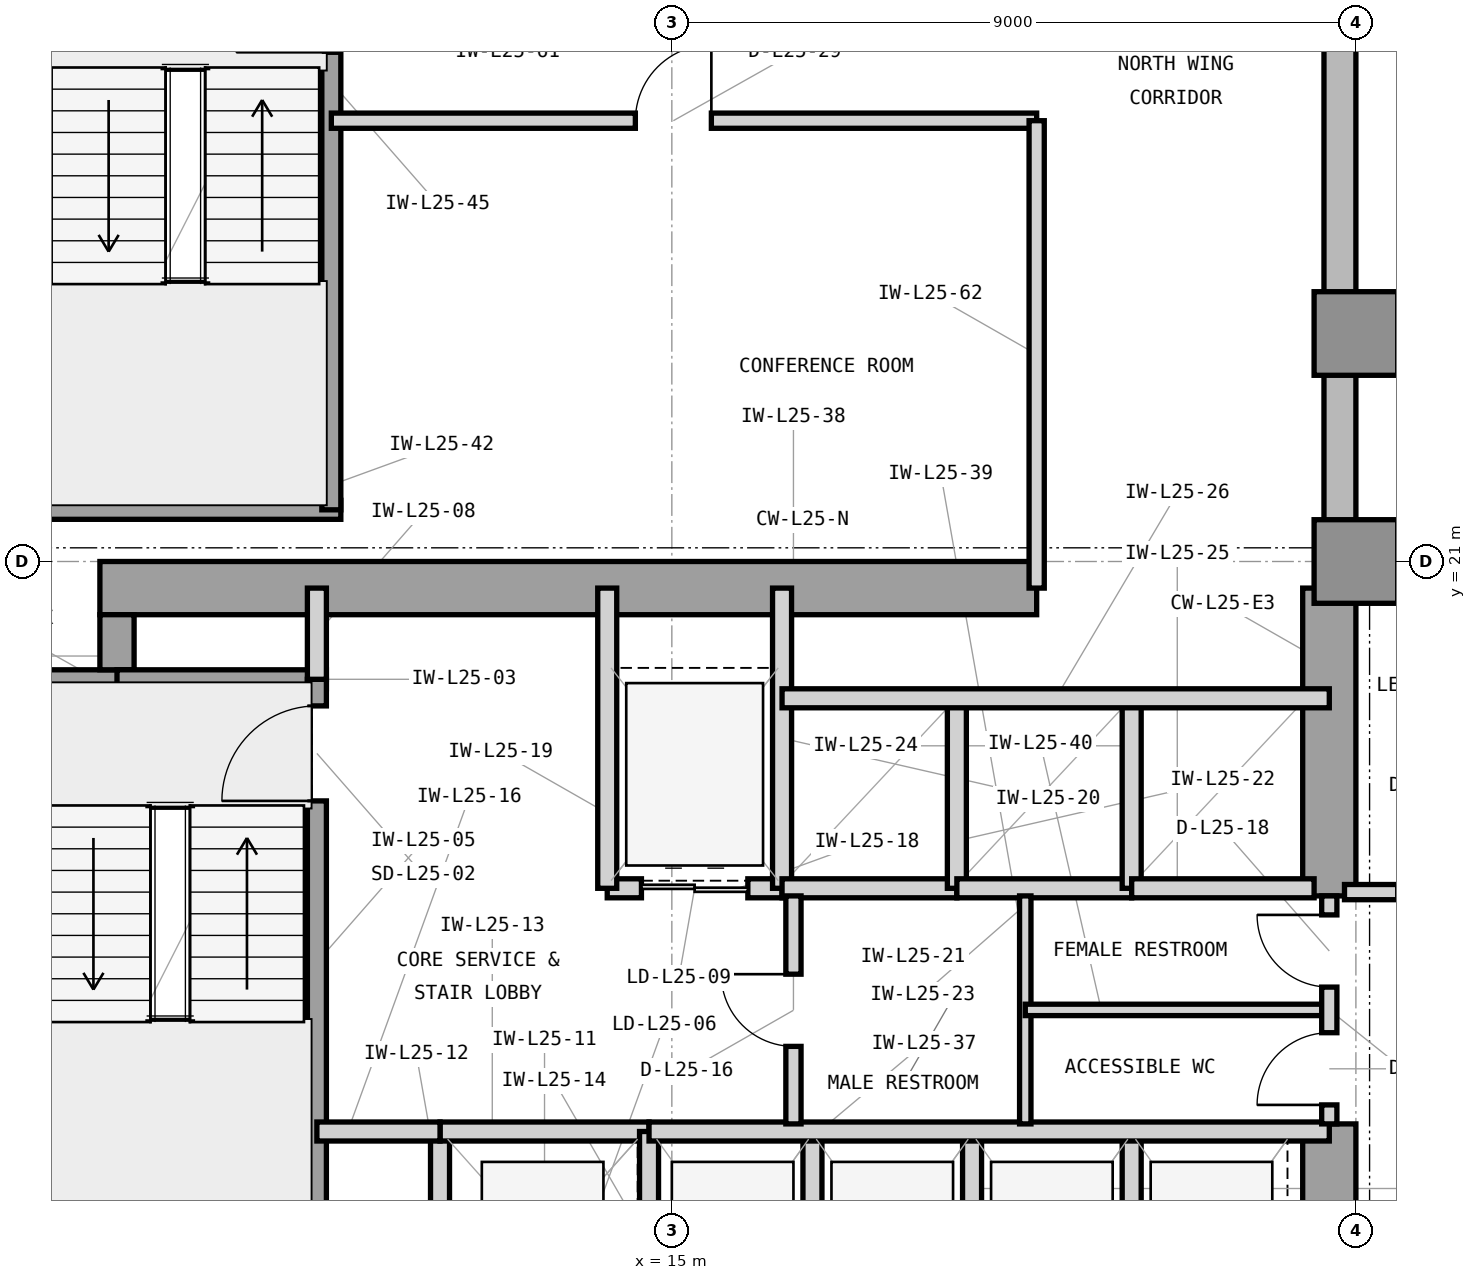
"""IFC4 building model, lengths in metres.
Left out: names, types, materials, properties, quantities, classifications, styles, units other than length and angle.
Written with IfcOpenShell. Run it as: python <this file> out.ifc"""

import sys

from ifc_helpers import new_model, si_unit, direction, frame, frame_2d, origin, origin_2d, place, context, subcontext, project, spatial, rectangle, extrude, element, fill, save


model = new_model("IFC4")
c1 = context("Model", 3, precision=1e-05, world=origin(), true_north=direction((0.0, 1.0)))
c2 = subcontext(c1, "Body", "Model", "MODEL_VIEW")
j1 = project(units=[si_unit("LENGTHUNIT", "METRE"), si_unit("PLANEANGLEUNIT", "RADIAN")], contexts=[c1])
p1 = place(None, origin())
s1 = spatial("IfcSite", under=j1, at=p1, CompositionType="ELEMENT")
p2 = place(p1, origin())
s2 = spatial("IfcBuilding", under=s1, at=p2, CompositionType="ELEMENT")
p3 = place(p2, frame((0.0, 0.0, 108.9)))
s3 = spatial("IfcBuildingStorey", under=s2, at=p3, CompositionType="ELEMENT", Elevation=108.9)
p4 = place(p3, frame((7.475, 20.65, 0.0), z_axis=(0.0, 0.0, 1.0), x_axis=(1.0, 0.0, 0.0)))
e1 = element("IfcWall", 1, at=p4, inside=s3, PredefinedType="SHEAR", context=c2, shape_type="SweptSolid", body=[
    extrude(rectangle(XDim=12.325, YDim=0.7, at=frame_2d((6.163, 0.0))), origin(), (0.0, 0.0, 1.0), 3.9),
])
p5 = place(p3, frame((23.65, 10.4, 0.0), z_axis=(0.0, 0.0, 1.0), x_axis=(0.0, 1.0, 0.0)))
e2 = element("IfcWall", 2, at=p5, inside=s3, PredefinedType="SHEAR", context=c2, shape_type="SweptSolid", body=[
    extrude(rectangle(XDim=3.2, YDim=0.7, at=frame_2d((1.6, 0.0))), origin(), (0.0, 0.0, 1.0), 3.9),
])
p6 = place(p3, frame((23.65, 16.6, 0.0), z_axis=(0.0, 0.0, 1.0), x_axis=(0.0, 1.0, 0.0)))
e3 = element("IfcWall", 3, at=p6, inside=s3, PredefinedType="SHEAR", context=c2, shape_type="SweptSolid", body=[
    extrude(rectangle(XDim=4.05, YDim=0.7, at=frame_2d((2.025, 0.0))), origin(), (0.0, 0.0, 1.0), 3.9),
])
p7 = place(p3, frame((6.7, 19.35, 0.0), z_axis=(0.0, 0.0, 1.0), x_axis=(1.0, 0.0, 0.0)))
e4 = element("IfcWall", 4, at=p7, inside=s3, PredefinedType="SHEAR", context=c2, shape_type="SweptSolid", body=[
    extrude(rectangle(XDim=1.225, YDim=0.45, at=frame_2d((0.613, 0.0))), origin(), (0.0, 0.0, 1.0), 3.9),
])
p8 = place(p3, frame((7.7, 19.575, 0.0), z_axis=(0.0, 0.0, 1.0), x_axis=(0.0, 1.0, 0.0)))
e5 = element("IfcWall", 5, at=p8, inside=s3, PredefinedType="SHEAR", context=c2, shape_type="SweptSolid", body=[
    extrude(rectangle(XDim=0.725, YDim=0.45, at=frame_2d((0.363, 0.0))), origin(), (0.0, 0.0, 1.0), 3.9),
])
for number, where, z_axis, x_axis in (
    (6, (24.0, 21.0, 0.0), (0.0, 0.0, 1.0), (1.0, 0.0, 0.0)),
    (7, (24.0, 24.0, 0.0), (0.0, 0.0, 1.0), (1.0, 0.0, 0.0)),
):
    element("IfcColumn", number, at=place(p3, frame(where, z_axis=z_axis, x_axis=x_axis)), inside=s3, PredefinedType="COLUMN", context=c2, shape_type="SweptSolid", body=[
        extrude(rectangle(XDim=1.1, YDim=1.1, at=origin_2d()), origin(), (0.0, 0.0, 1.0), 3.9),
    ])
p9 = place(p3, frame((61.4, 20.79, 0.0), z_axis=(0.0, 0.0, 1.0), x_axis=(-1.0, 0.0, 0.0)))
e8 = element("IfcWall", 8, at=p9, inside=s3, PredefinedType="STANDARD", context=c2, shape_type="SweptSolid", body=[
    extrude(rectangle(XDim=37.4, YDim=0.42, at=frame_2d((18.7, 0.0))), origin(), (0.0, 0.0, 1.0), 3.7),
])
p10 = place(p9, frame((35.222, 0.0, 0.85)))
e9 = element("IfcOpeningElement", 9, at=p10, cuts=e8, PredefinedType="OPENING", context=c2, shape_type="SweptSolid", body=[
    extrude(rectangle(XDim=1.2, YDim=2.25, at=frame_2d((0.6, 1.125))), frame((0.0, 0.22, 0.0), z_axis=(0.0, -1.0, 0.0), x_axis=(1.0, 0.0, 0.0)), (0.0, 0.0, 1.0), 0.44),
])
p11 = place(p9, frame((29.386, 0.0, 0.85)))
e10 = element("IfcOpeningElement", 10, at=p11, cuts=e8, PredefinedType="OPENING", context=c2, shape_type="SweptSolid", body=[
    extrude(rectangle(XDim=2.5, YDim=2.25, at=frame_2d((1.25, 1.125))), frame((0.0, 0.22, 0.0), z_axis=(0.0, -1.0, 0.0), x_axis=(1.0, 0.0, 0.0)), (0.0, 0.0, 1.0), 0.44),
])
p12 = place(p9, frame((20.386, 0.0, 0.85)))
e11 = element("IfcOpeningElement", 11, at=p12, cuts=e8, PredefinedType="OPENING", context=c2, shape_type="SweptSolid", body=[
    extrude(rectangle(XDim=2.5, YDim=2.25, at=frame_2d((1.25, 1.125))), frame((0.0, 0.22, 0.0), z_axis=(0.0, -1.0, 0.0), x_axis=(1.0, 0.0, 0.0)), (0.0, 0.0, 1.0), 0.44),
])
p13 = place(p9, frame((8.336, 0.0, 0.85)))
e12 = element("IfcOpeningElement", 12, at=p13, cuts=e8, PredefinedType="OPENING", context=c2, shape_type="SweptSolid", body=[
    extrude(rectangle(XDim=1.2, YDim=2.25, at=frame_2d((0.6, 1.125))), frame((0.0, 0.22, 0.0), z_axis=(0.0, -1.0, 0.0), x_axis=(1.0, 0.0, 0.0)), (0.0, 0.0, 1.0), 0.44),
])
p14 = place(p3, frame((23.79, 21.0, 0.0), z_axis=(0.0, 0.0, 1.0), x_axis=(0.0, 1.0, 0.0)))
e13 = element("IfcWall", 13, at=p14, inside=s3, PredefinedType="STANDARD", context=c2, shape_type="SweptSolid", body=[
    extrude(rectangle(XDim=25.4, YDim=0.42, at=frame_2d((12.7, 0.0))), origin(), (0.0, 0.0, 1.0), 3.7),
])
p15 = place(p14, frame((11.45, 0.0, 0.85)))
e14 = element("IfcOpeningElement", 14, at=p15, cuts=e13, PredefinedType="OPENING", context=c2, shape_type="SweptSolid", body=[
    extrude(rectangle(XDim=2.5, YDim=2.25, at=frame_2d((1.25, 1.125))), frame((0.0, 0.22, 0.0), z_axis=(0.0, -1.0, 0.0), x_axis=(1.0, 0.0, 0.0)), (0.0, 0.0, 1.0), 0.44),
])
p16 = place(p3, frame((7.7, 19.45, 0.0), z_axis=(0.0, 0.0, 1.0), x_axis=(1.0, 0.0, 0.0)))
e15 = element("IfcWall", 15, at=p16, inside=s3, PredefinedType="SHEAR", context=c2, shape_type="SweptSolid", body=[
    extrude(rectangle(XDim=2.755, YDim=0.25, at=frame_2d((1.377, 0.0))), origin(), (0.0, 0.0, 1.0), 3.9),
])
p17 = place(p3, frame((10.33, 12.0, 0.0), z_axis=(0.0, 0.0, 1.0), x_axis=(0.0, 1.0, 0.0)))
e16 = element("IfcWall", 16, at=p17, inside=s3, PredefinedType="SHEAR", context=c2, shape_type="SweptSolid", body=[
    extrude(rectangle(XDim=7.45, YDim=0.25, at=frame_2d((3.725, 0.0))), origin(), (0.0, 0.0, 1.0), 3.9),
])
p18 = place(p17, frame((5.85, 0.0, 0.0)))
e17 = element("IfcOpeningElement", 17, at=p18, cuts=e16, PredefinedType="OPENING", context=c2, shape_type="SweptSolid", body=[
    extrude(rectangle(XDim=1.25, YDim=2.2, at=frame_2d((0.625, 1.1))), frame((0.0, 0.135, 0.0), z_axis=(0.0, -1.0, 0.0), x_axis=(1.0, 0.0, 0.0)), (0.0, 0.0, 1.0), 0.27),
])
p19 = place(p3, frame((10.33, 19.45, 0.0), z_axis=(0.0, 0.0, 1.0), x_axis=(0.0, 1.0, 0.0)))
e18 = element("IfcWall", 18, at=p19, inside=s3, PredefinedType="PARTITIONING", context=c2, shape_type="SweptSolid", body=[
    extrude(rectangle(XDim=1.2, YDim=0.25, at=frame_2d((0.6, 0.0))), origin(), (0.0, 0.0, 1.0), 2.917),
])
p20 = place(p3, frame((11.95, 10.5, 0.0), z_axis=(0.0, 0.0, 1.0), x_axis=(0.0, 1.0, 0.0)))
e19 = element("IfcWall", 19, at=p20, inside=s3, PredefinedType="PARTITIONING", context=c2, shape_type="SweptSolid", body=[
    extrude(rectangle(XDim=3.0, YDim=0.25, at=frame_2d((1.5, 0.0))), origin(), (0.0, 0.0, 1.0), 3.69),
])
p21 = place(p3, frame((11.95, 13.5, 0.0), z_axis=(0.0, 0.0, 1.0), x_axis=(1.0, 0.0, 0.0)))
e20 = element("IfcWall", 20, at=p21, inside=s3, PredefinedType="PARTITIONING", context=c2, shape_type="SweptSolid", body=[
    extrude(rectangle(XDim=2.75, YDim=0.25, at=frame_2d((1.375, 0.0))), origin(), (0.0, 0.0, 1.0), 3.227),
])
p22 = place(p3, frame((14.7, 10.5, 0.0), z_axis=(0.0, 0.0, 1.0), x_axis=(0.0, 1.0, 0.0)))
e21 = element("IfcWall", 21, at=p22, inside=s3, PredefinedType="PARTITIONING", context=c2, shape_type="SweptSolid", body=[
    extrude(rectangle(XDim=3.0, YDim=0.25, at=frame_2d((1.5, 0.0))), origin(), (0.0, 0.0, 1.0), 3.69),
])
p23 = place(p3, frame((10.33, 13.5, 0.0), z_axis=(0.0, 0.0, 1.0), x_axis=(1.0, 0.0, 0.0)))
e22 = element("IfcWall", 22, at=p23, inside=s3, PredefinedType="PARTITIONING", context=c2, shape_type="SweptSolid", body=[
    extrude(rectangle(XDim=1.62, YDim=0.25, at=frame_2d((0.81, 0.0))), origin(), (0.0, 0.0, 1.0), 3.227),
])
p24 = place(p3, frame((14.15, 16.7, 0.0), z_axis=(0.0, 0.0, 1.0), x_axis=(1.0, 0.0, 0.0)))
e23 = element("IfcWall", 23, at=p24, inside=s3, PredefinedType="PARTITIONING", context=c2, shape_type="SweptSolid", body=[
    extrude(rectangle(XDim=2.3, YDim=0.25, at=frame_2d((1.15, 0.0))), origin(), (0.0, 0.0, 1.0), 3.227),
])
p25 = place(p24, frame((0.45, 0.0, 0.0)))
e24 = element("IfcOpeningElement", 24, at=p25, cuts=e23, PredefinedType="OPENING", context=c2, shape_type="SweptSolid", body=[
    extrude(rectangle(XDim=1.4, YDim=2.35, at=frame_2d((0.7, 1.175))), frame((0.0, 0.135, 0.0), z_axis=(0.0, -1.0, 0.0), x_axis=(1.0, 0.0, 0.0)), (0.0, 0.0, 1.0), 0.27),
])
for number, where, z_axis, x_axis in (
    (25, (14.15, 16.7, 0.0), (0.0, 0.0, 1.0), (0.0, 1.0, 0.0)),
    (26, (16.45, 16.7, 0.0), (0.0, 0.0, 1.0), (0.0, 1.0, 0.0)),
):
    element("IfcWall", number, at=place(p3, frame(where, z_axis=z_axis, x_axis=x_axis)), inside=s3, PredefinedType="PARTITIONING", context=c2, shape_type="SweptSolid", body=[
        extrude(rectangle(XDim=3.95, YDim=0.25, at=frame_2d((1.975, 0.0))), origin(), (0.0, 0.0, 1.0), 3.69),
    ])
p26 = place(p3, frame((16.45, 16.7, 0.0), z_axis=(0.0, 0.0, 1.0), x_axis=(1.0, 0.0, 0.0)))
e27 = element("IfcWall", 27, at=p26, inside=s3, PredefinedType="PARTITIONING", context=c2, shape_type="SweptSolid", body=[
    extrude(rectangle(XDim=2.3, YDim=0.25, at=frame_2d((1.15, 0.0))), origin(), (0.0, 0.0, 1.0), 3.227),
])
p27 = place(p3, frame((18.75, 16.7, 0.0), z_axis=(0.0, 0.0, 1.0), x_axis=(0.0, 1.0, 0.0)))
e28 = element("IfcWall", 28, at=p27, inside=s3, PredefinedType="PARTITIONING", context=c2, shape_type="SweptSolid", body=[
    extrude(rectangle(XDim=2.5, YDim=0.25, at=frame_2d((1.25, 0.0))), origin(), (0.0, 0.0, 1.0), 3.69),
])
p28 = place(p3, frame((18.75, 16.7, 0.0), z_axis=(0.0, 0.0, 1.0), x_axis=(1.0, 0.0, 0.0)))
e29 = element("IfcWall", 29, at=p28, inside=s3, PredefinedType="PARTITIONING", context=c2, shape_type="SweptSolid", body=[
    extrude(rectangle(XDim=2.3, YDim=0.25, at=frame_2d((1.15, 0.0))), origin(), (0.0, 0.0, 1.0), 3.227),
])
p29 = place(p3, frame((21.05, 16.7, 0.0), z_axis=(0.0, 0.0, 1.0), x_axis=(0.0, 1.0, 0.0)))
e30 = element("IfcWall", 30, at=p29, inside=s3, PredefinedType="PARTITIONING", context=c2, shape_type="SweptSolid", body=[
    extrude(rectangle(XDim=2.5, YDim=0.25, at=frame_2d((1.25, 0.0))), origin(), (0.0, 0.0, 1.0), 3.69),
])
p30 = place(p3, frame((21.05, 16.7, 0.0), z_axis=(0.0, 0.0, 1.0), x_axis=(1.0, 0.0, 0.0)))
e31 = element("IfcWall", 31, at=p30, inside=s3, PredefinedType="PARTITIONING", context=c2, shape_type="SweptSolid", body=[
    extrude(rectangle(XDim=2.4, YDim=0.25, at=frame_2d((1.2, 0.0))), origin(), (0.0, 0.0, 1.0), 3.227),
])
p31 = place(p3, frame((16.45, 19.2, 0.0), z_axis=(0.0, 0.0, 1.0), x_axis=(1.0, 0.0, 0.0)))
e32 = element("IfcWall", 32, at=p31, inside=s3, PredefinedType="PARTITIONING", context=c2, shape_type="SweptSolid", body=[
    extrude(rectangle(XDim=7.2, YDim=0.25, at=frame_2d((3.6, 0.0))), origin(), (0.0, 0.0, 1.0), 3.69),
])
for number, where, z_axis, x_axis in (
    (33, (16.85, 10.5, 0.0), (0.0, 0.0, 1.0), (0.0, 1.0, 0.0)),
    (34, (18.95, 10.5, 0.0), (0.0, 0.0, 1.0), (0.0, 1.0, 0.0)),
    (35, (21.05, 10.5, 0.0), (0.0, 0.0, 1.0), (0.0, 1.0, 0.0)),
):
    element("IfcWall", number, at=place(p3, frame(where, z_axis=z_axis, x_axis=x_axis)), inside=s3, PredefinedType="PARTITIONING", context=c2, shape_type="SweptSolid", body=[
        extrude(rectangle(XDim=3.0, YDim=0.25, at=frame_2d((1.5, 0.0))), origin(), (0.0, 0.0, 1.0), 3.69),
    ])
p32 = place(p3, frame((14.7, 13.5, 0.0), z_axis=(0.0, 0.0, 1.0), x_axis=(1.0, 0.0, 0.0)))
e36 = element("IfcWall", 36, at=p32, inside=s3, PredefinedType="PARTITIONING", context=c2, shape_type="SweptSolid", body=[
    extrude(rectangle(XDim=8.95, YDim=0.25, at=frame_2d((4.475, 0.0))), origin(), (0.0, 0.0, 1.0), 3.227),
])
p33 = place(p3, frame((16.6, 13.6, 0.0), z_axis=(0.0, 0.0, 1.0), x_axis=(0.0, 1.0, 0.0)))
e37 = element("IfcWall", 37, at=p33, inside=s3, PredefinedType="PARTITIONING", context=c2, shape_type="SweptSolid", body=[
    extrude(rectangle(XDim=3.0, YDim=0.2, at=frame_2d((1.5, 0.0))), origin(), (0.0, 0.0, 1.0), 3.69),
])
p34 = place(p33, frame((1.02, 0.0, 0.0)))
e38 = element("IfcOpeningElement", 38, at=p34, cuts=e37, PredefinedType="OPENING", context=c2, shape_type="SweptSolid", body=[
    extrude(rectangle(XDim=0.95, YDim=2.1, at=frame_2d((0.475, 1.05))), frame((0.0, 0.11, 0.0), z_axis=(0.0, -1.0, 0.0), x_axis=(1.0, 0.0, 0.0)), (0.0, 0.0, 1.0), 0.22),
])
p35 = place(p3, frame((19.65, 13.6, 0.0), z_axis=(0.0, 0.0, 1.0), x_axis=(0.0, 1.0, 0.0)))
e39 = element("IfcWall", 39, at=p35, inside=s3, PredefinedType="PARTITIONING", context=c2, shape_type="SweptSolid", body=[
    extrude(rectangle(XDim=3.0, YDim=0.15, at=frame_2d((1.5, 0.0))), origin(), (0.0, 0.0, 1.0), 3.69),
])
p36 = place(p3, frame((19.65, 15.1, 0.0), z_axis=(0.0, 0.0, 1.0), x_axis=(1.0, 0.0, 0.0)))
e40 = element("IfcWall", 40, at=p36, inside=s3, PredefinedType="PARTITIONING", context=c2, shape_type="SweptSolid", body=[
    extrude(rectangle(XDim=4.0, YDim=0.15, at=frame_2d((2.0, 0.0))), origin(), (0.0, 0.0, 1.0), 3.69),
])
p37 = place(p3, frame((23.65, 13.6, 0.0), z_axis=(0.0, 0.0, 1.0), x_axis=(0.0, 1.0, 0.0)))
e41 = element("IfcWall", 41, at=p37, inside=s3, PredefinedType="PARTITIONING", context=c2, shape_type="SweptSolid", body=[
    extrude(rectangle(XDim=3.0, YDim=0.2, at=frame_2d((1.5, 0.0))), origin(), (0.0, 0.0, 1.0), 3.69),
])
p38 = place(p37, frame((0.25, 0.0, 0.0)))
e42 = element("IfcOpeningElement", 42, at=p38, cuts=e41, PredefinedType="OPENING", context=c2, shape_type="SweptSolid", body=[
    extrude(rectangle(XDim=0.95, YDim=2.1, at=frame_2d((0.475, 1.05))), frame((0.0, 0.11, 0.0), z_axis=(0.0, -1.0, 0.0), x_axis=(1.0, 0.0, 0.0)), (0.0, 0.0, 1.0), 0.22),
])
p39 = place(p37, frame((1.8, 0.0, 0.0)))
e43 = element("IfcOpeningElement", 43, at=p39, cuts=e41, PredefinedType="OPENING", context=c2, shape_type="SweptSolid", body=[
    extrude(rectangle(XDim=0.95, YDim=2.1, at=frame_2d((0.475, 1.05))), frame((0.0, 0.11, 0.0), z_axis=(0.0, -1.0, 0.0), x_axis=(1.0, 0.0, 0.0)), (0.0, 0.0, 1.0), 0.22),
])
p40 = place(p3, frame((6.555, 21.68, 0.0), z_axis=(0.0, 0.0, 1.0), x_axis=(1.0, 0.0, 0.0)))
e44 = element("IfcWall", 44, at=p40, inside=s3, PredefinedType="SHEAR", context=c2, shape_type="SweptSolid", body=[
    extrude(rectangle(XDim=4.09, YDim=0.25, at=frame_2d((2.045, 0.0))), origin(), (0.0, 0.0, 1.0), 3.9),
])
p41 = place(p3, frame((10.52, 21.68, 0.0), z_axis=(0.0, 0.0, 1.0), x_axis=(0.0, 1.0, 0.0)))
e45 = element("IfcWall", 45, at=p41, inside=s3, PredefinedType="SHEAR", context=c2, shape_type="SweptSolid", body=[
    extrude(rectangle(XDim=7.5, YDim=0.25, at=frame_2d((3.75, 0.0))), origin(), (0.0, 0.0, 1.0), 3.9),
])
p42 = place(p41, frame((6.02, 0.0, 0.0)))
e46 = element("IfcOpeningElement", 46, at=p42, cuts=e45, PredefinedType="OPENING", context=c2, shape_type="SweptSolid", body=[
    extrude(rectangle(XDim=1.25, YDim=2.2, at=frame_2d((0.625, 1.1))), frame((0.0, 0.135, 0.0), z_axis=(0.0, -1.0, 0.0), x_axis=(1.0, 0.0, 0.0)), (0.0, 0.0, 1.0), 0.27),
])
p43 = place(p3, frame((23.85, 16.65, 0.0), z_axis=(0.0, 0.0, 1.0), x_axis=(1.0, 0.0, 0.0)))
e47 = element("IfcWall", 47, at=p43, inside=s3, PredefinedType="PARTITIONING", context=c2, shape_type="SweptSolid", body=[
    extrude(rectangle(XDim=2.85, YDim=0.2, at=frame_2d((1.425, 0.0))), origin(), (0.0, 0.0, 1.0), 3.69),
])
p44 = place(p43, frame((0.7, 0.0, 0.0)))
e48 = element("IfcOpeningElement", 48, at=p44, cuts=e47, PredefinedType="OPENING", context=c2, shape_type="SweptSolid", body=[
    extrude(rectangle(XDim=1.0, YDim=2.15, at=frame_2d((0.5, 1.075))), frame((0.0, 0.11, 0.0), z_axis=(0.0, -1.0, 0.0), x_axis=(1.0, 0.0, 0.0)), (0.0, 0.0, 1.0), 0.22),
])
p45 = place(p3, frame((10.52, 26.8, 0.0), z_axis=(0.0, 0.0, 1.0), x_axis=(1.0, 0.0, 0.0)))
e49 = element("IfcWall", 49, at=p45, inside=s3, PredefinedType="PARTITIONING", context=c2, shape_type="SweptSolid", body=[
    extrude(rectangle(XDim=9.28, YDim=0.2, at=frame_2d((4.64, 0.0))), origin(), (0.0, 0.0, 1.0), 3.69),
])
p46 = place(p45, frame((4.0, 0.0, 0.0)))
e50 = element("IfcOpeningElement", 50, at=p46, cuts=e49, PredefinedType="OPENING", context=c2, shape_type="SweptSolid", body=[
    extrude(rectangle(XDim=1.0, YDim=2.15, at=frame_2d((0.5, 1.075))), frame((0.0, 0.11, 0.0), z_axis=(0.0, -1.0, 0.0), x_axis=(1.0, 0.0, 0.0)), (0.0, 0.0, 1.0), 0.22),
])
p47 = place(p3, frame((19.8, 20.65, 0.0), z_axis=(0.0, 0.0, 1.0), x_axis=(0.0, 1.0, 0.0)))
e51 = element("IfcWall", 51, at=p47, inside=s3, PredefinedType="PARTITIONING", context=c2, shape_type="SweptSolid", body=[
    extrude(rectangle(XDim=6.15, YDim=0.2, at=frame_2d((3.075, 0.0))), origin(), (0.0, 0.0, 1.0), 3.69),
])
p48 = place(p18, origin())
e52 = element("IfcDoor", 52, at=p48, inside=s3, OperationType="SINGLE_SWING_LEFT", PredefinedType="DOOR", context=c2, shape_type="SweptSolid", body=[
    extrude(rectangle(XDim=1.25, YDim=2.2, at=frame_2d((0.625, 1.1))), frame((0.0, 0.025, 0.0), z_axis=(0.0, -1.0, 0.0), x_axis=(1.0, 0.0, 0.0)), (0.0, 0.0, 1.0), 0.05),
])
fill(e17, e52)
p49 = place(p25, origin())
e53 = element("IfcDoor", 53, at=p49, inside=s3, OperationType="DOUBLE_DOOR_SLIDING", PredefinedType="DOOR", context=c2, shape_type="SweptSolid", body=[
    extrude(rectangle(XDim=1.4, YDim=2.35, at=frame_2d((0.7, 1.175))), frame((0.0, 0.025, 0.0), z_axis=(0.0, -1.0, 0.0), x_axis=(1.0, 0.0, 0.0)), (0.0, 0.0, 1.0), 0.05),
])
fill(e24, e53)
p50 = place(p34, origin())
e54 = element("IfcDoor", 54, at=p50, inside=s3, OperationType="SINGLE_SWING_RIGHT", PredefinedType="DOOR", context=c2, shape_type="SweptSolid", body=[
    extrude(rectangle(XDim=0.95, YDim=2.1, at=frame_2d((0.475, 1.05))), frame((0.0, 0.025, 0.0), z_axis=(0.0, -1.0, 0.0), x_axis=(1.0, 0.0, 0.0)), (0.0, 0.0, 1.0), 0.05),
])
fill(e38, e54)
p51 = place(p38, origin())
e55 = element("IfcDoor", 55, at=p51, inside=s3, OperationType="SINGLE_SWING_LEFT", PredefinedType="DOOR", context=c2, shape_type="SweptSolid", body=[
    extrude(rectangle(XDim=0.95, YDim=2.1, at=frame_2d((0.475, 1.05))), frame((0.0, 0.025, 0.0), z_axis=(0.0, -1.0, 0.0), x_axis=(1.0, 0.0, 0.0)), (0.0, 0.0, 1.0), 0.05),
])
fill(e42, e55)
p52 = place(p39, origin())
e56 = element("IfcDoor", 56, at=p52, inside=s3, OperationType="SINGLE_SWING_RIGHT", PredefinedType="DOOR", context=c2, shape_type="SweptSolid", body=[
    extrude(rectangle(XDim=0.95, YDim=2.1, at=frame_2d((0.475, 1.05))), frame((0.0, 0.025, 0.0), z_axis=(0.0, -1.0, 0.0), x_axis=(1.0, 0.0, 0.0)), (0.0, 0.0, 1.0), 0.05),
])
fill(e43, e56)
p53 = place(p46, origin())
e57 = element("IfcDoor", 57, at=p53, inside=s3, OperationType="SINGLE_SWING_RIGHT", PredefinedType="DOOR", context=c2, shape_type="SweptSolid", body=[
    extrude(rectangle(XDim=1.0, YDim=2.15, at=frame_2d((0.5, 1.075))), frame((0.0, 0.025, 0.0), z_axis=(0.0, -1.0, 0.0), x_axis=(1.0, 0.0, 0.0)), (0.0, 0.0, 1.0), 0.05),
])
fill(e50, e57)
save(model, sys.argv[1])
